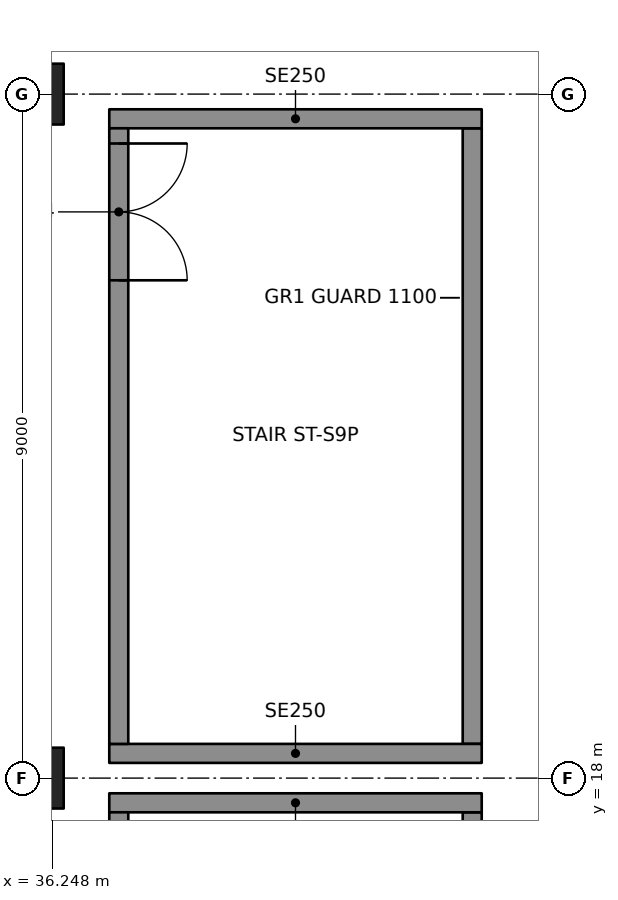
"""IFC4 building model, lengths in metres.
Left out: names, types, materials, properties, quantities, classifications, styles, units other than length and angle.
Written with IfcOpenShell. Run it as: python <this file> out.ifc"""

import sys

from ifc_helpers import new_model, si_unit, direction, frame, frame_2d, origin, origin_2d, place, context, subcontext, project, spatial, rectangle, hollow_rectangle, extrude, element, fill, save


model = new_model("IFC4")
c1 = context("Model", 3, precision=1e-05, world=origin(), true_north=direction((0.0, 1.0)))
c2 = subcontext(c1, "Body", "Model", "MODEL_VIEW")
j1 = project(units=[si_unit("LENGTHUNIT", "METRE"), si_unit("PLANEANGLEUNIT", "RADIAN")], contexts=[c1])
p1 = place(None, origin())
s1 = spatial("IfcSite", under=j1, at=p1, CompositionType="ELEMENT")
p2 = place(p1, origin())
s2 = spatial("IfcBuilding", under=s1, at=p2, CompositionType="ELEMENT")
p3 = place(p2, frame((0.0, 0.0, 16.0)))
s3 = spatial("IfcBuildingStorey", under=s2, at=p3, CompositionType="ELEMENT", Elevation=16.0)
for number, where, z_axis, x_axis in (
    (1, (36.0, 18.0, 0.0), (0.0, 0.0, 1.0), (0.0, 1.0, 0.0)),
    (2, (36.0, 27.0, 0.0), (0.0, 0.0, 1.0), (1.0, 0.0, 0.0)),
):
    element("IfcColumn", number, at=place(p3, frame(where, z_axis=z_axis, x_axis=x_axis)), inside=s3, PredefinedType="COLUMN", context=c2, shape_type="SweptSolid", body=[
        extrude(hollow_rectangle(XDim=0.8, YDim=0.8, WallThickness=0.1, at=origin_2d()), origin(), (0.0, 0.0, 1.0), 7.0),
    ])
p4 = place(p3, frame((37.0, 17.675, 0.0), z_axis=(0.0, 0.0, 1.0), x_axis=(1.0, 0.0, 0.0)))
e3 = element("IfcWall", 3, at=p4, inside=s3, PredefinedType="SOLIDWALL", context=c2, shape_type="SweptSolid", body=[
    extrude(rectangle(XDim=4.9, YDim=0.25, at=frame_2d((2.45, 0.0))), origin(), (0.0, 0.0, 1.0), 6.7),
])
p5 = place(p3, frame((37.125, 9.45, 0.0), z_axis=(0.0, 0.0, 1.0), x_axis=(0.0, 1.0, 0.0)))
e4 = element("IfcWall", 4, at=p5, inside=s3, PredefinedType="SOLIDWALL", context=c2, shape_type="SweptSolid", body=[
    extrude(rectangle(XDim=8.1, YDim=0.25, at=frame_2d((4.05, 0.0))), origin(), (0.0, 0.0, 1.0), 6.7),
])
p6 = place(p5, frame((6.1, 0.0, 0.0)))
e5 = element("IfcOpeningElement", 5, at=p6, cuts=e4, PredefinedType="OPENING", context=c2, shape_type="SweptSolid", body=[
    extrude(rectangle(XDim=1.8, YDim=2.1, at=frame_2d((0.9, 1.05))), frame((0.0, 0.135, 0.0), z_axis=(0.0, -1.0, 0.0), x_axis=(1.0, 0.0, 0.0)), (0.0, 0.0, 1.0), 0.27),
])
p7 = place(p3, frame((41.775, 9.45, 0.0), z_axis=(0.0, 0.0, 1.0), x_axis=(0.0, 1.0, 0.0)))
e6 = element("IfcWall", 6, at=p7, inside=s3, PredefinedType="SOLIDWALL", context=c2, shape_type="SweptSolid", body=[
    extrude(rectangle(XDim=8.1, YDim=0.25, at=frame_2d((4.05, 0.0))), origin(), (0.0, 0.0, 1.0), 6.7),
])
for number, where, z_axis, x_axis in (
    (7, (37.0, 18.325, 0.0), (0.0, 0.0, 1.0), (1.0, 0.0, 0.0)),
    (8, (37.0, 26.675, 0.0), (0.0, 0.0, 1.0), (1.0, 0.0, 0.0)),
):
    element("IfcWall", number, at=place(p3, frame(where, z_axis=z_axis, x_axis=x_axis)), inside=s3, PredefinedType="SOLIDWALL", context=c2, shape_type="SweptSolid", body=[
        extrude(rectangle(XDim=4.9, YDim=0.25, at=frame_2d((2.45, 0.0))), origin(), (0.0, 0.0, 1.0), 6.7),
    ])
p8 = place(p3, frame((37.125, 18.45, 0.0), z_axis=(0.0, 0.0, 1.0), x_axis=(0.0, 1.0, 0.0)))
e9 = element("IfcWall", 9, at=p8, inside=s3, PredefinedType="SOLIDWALL", context=c2, shape_type="SweptSolid", body=[
    extrude(rectangle(XDim=8.1, YDim=0.25, at=frame_2d((4.05, 0.0))), origin(), (0.0, 0.0, 1.0), 6.7),
])
p9 = place(p8, frame((6.1, 0.0, 0.0)))
e10 = element("IfcOpeningElement", 10, at=p9, cuts=e9, PredefinedType="OPENING", context=c2, shape_type="SweptSolid", body=[
    extrude(rectangle(XDim=1.8, YDim=2.1, at=frame_2d((0.9, 1.05))), frame((0.0, 0.135, 0.0), z_axis=(0.0, -1.0, 0.0), x_axis=(1.0, 0.0, 0.0)), (0.0, 0.0, 1.0), 0.27),
])
p10 = place(p3, frame((41.775, 18.45, 0.0), z_axis=(0.0, 0.0, 1.0), x_axis=(0.0, 1.0, 0.0)))
e11 = element("IfcWall", 11, at=p10, inside=s3, PredefinedType="SOLIDWALL", context=c2, shape_type="SweptSolid", body=[
    extrude(rectangle(XDim=8.1, YDim=0.25, at=frame_2d((4.05, 0.0))), origin(), (0.0, 0.0, 1.0), 6.7),
])
p11 = place(p9, frame((1.8, 0.0, 0.0), z_axis=(0.0, 0.0, 1.0), x_axis=(-1.0, 0.0, 0.0)))
e12 = element("IfcDoor", 12, at=p11, inside=s3, OperationType="DOUBLE_DOOR_SINGLE_SWING", PredefinedType="DOOR", context=c2, shape_type="SweptSolid", body=[
    extrude(rectangle(XDim=1.8, YDim=2.1, at=frame_2d((0.9, 1.05))), frame((0.0, 0.025, 0.0), z_axis=(0.0, -1.0, 0.0), x_axis=(1.0, 0.0, 0.0)), (0.0, 0.0, 1.0), 0.05),
])
fill(e10, e12)
save(model, sys.argv[1])
